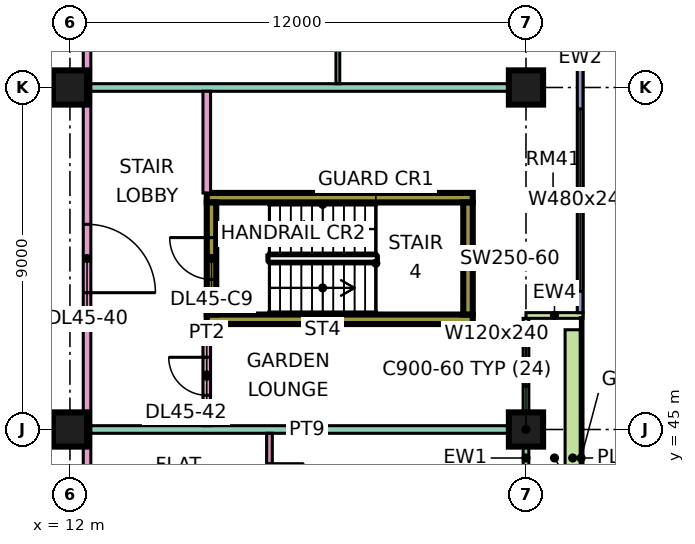
"""IFC4 building model, lengths in metres.
Left out: names, types, materials, properties, quantities, classifications, styles, units other than length and angle.
Written with IfcOpenShell. Run it as: python <this file> out.ifc"""

import sys

from ifc_helpers import new_model, si_unit, direction, frame, frame_2d, origin, origin_2d, place, context, subcontext, project, spatial, rectangle, extrude, element, fill, save


model = new_model("IFC4")
c1 = context("Model", 3, precision=1e-05, world=origin(), true_north=direction((0.0, 1.0)))
c2 = subcontext(c1, "Body", "Model", "MODEL_VIEW")
j1 = project(units=[si_unit("LENGTHUNIT", "METRE"), si_unit("PLANEANGLEUNIT", "RADIAN")], contexts=[c1])
p1 = place(None, origin())
s1 = spatial("IfcSite", under=j1, at=p1, CompositionType="ELEMENT")
p2 = place(p1, origin())
s2 = spatial("IfcBuilding", under=s1, at=p2, CompositionType="ELEMENT")
p3 = place(p2, frame((0.0, 0.0, 194.9)))
s3 = spatial("IfcBuildingStorey", under=s2, at=p3, CompositionType="ELEMENT", Elevation=194.9)
for number, where, z_axis, x_axis in (
    (1, (12.0, 45.0, 0.0), (0.0, 0.0, 1.0), (1.0, 0.0, 0.0)),
    (2, (12.0, 54.0, 0.0), (0.0, 0.0, 1.0), (1.0, 0.0, 0.0)),
    (3, (24.0, 45.0, 0.0), (0.0, 0.0, 1.0), (1.0, 0.0, 0.0)),
    (4, (24.0, 54.0, 0.0), (0.0, 0.0, 1.0), (1.0, 0.0, 0.0)),
):
    element("IfcColumn", number, at=place(p3, frame(where, z_axis=z_axis, x_axis=x_axis)), inside=s3, PredefinedType="COLUMN", context=c2, shape_type="SweptSolid", body=[
        extrude(rectangle(XDim=0.9, YDim=0.9, at=origin_2d()), origin(), (0.0, 0.0, 1.0), 3.75),
    ])
for number, where, z_axis, x_axis in (
    (5, (15.6, 47.9, 0.0), (0.0, 0.0, 1.0), (1.0, 0.0, 0.0)),
    (6, (15.6, 51.1, 0.0), (0.0, 0.0, 1.0), (1.0, 0.0, 0.0)),
):
    element("IfcWall", number, at=place(p3, frame(where, z_axis=z_axis, x_axis=x_axis)), inside=s3, PredefinedType="SHEAR", context=c2, shape_type="SweptSolid", body=[
        extrude(rectangle(XDim=7.0, YDim=0.25, at=frame_2d((3.5, 0.0))), origin(), (0.0, 0.0, 1.0), 3.75),
    ])
p4 = place(p3, frame((15.725, 48.025, 0.0), z_axis=(0.0, 0.0, 1.0), x_axis=(0.0, 1.0, 0.0)))
e7 = element("IfcWall", 7, at=p4, inside=s3, PredefinedType="SHEAR", context=c2, shape_type="SweptSolid", body=[
    extrude(rectangle(XDim=2.95, YDim=0.25, at=frame_2d((1.475, 0.0))), origin(), (0.0, 0.0, 1.0), 3.75),
])
p5 = place(p4, frame((0.925, 0.0, 0.0)))
e8 = element("IfcOpeningElement", 8, at=p5, cuts=e7, PredefinedType="OPENING", context=c2, shape_type="SweptSolid", body=[
    extrude(rectangle(XDim=1.1, YDim=2.2, at=frame_2d((0.55, 1.1))), frame((0.0, 0.135, 0.0), z_axis=(0.0, -1.0, 0.0), x_axis=(1.0, 0.0, 0.0)), (0.0, 0.0, 1.0), 0.27),
])
p6 = place(p3, frame((22.475, 48.025, 0.0), z_axis=(0.0, 0.0, 1.0), x_axis=(0.0, 1.0, 0.0)))
e9 = element("IfcWall", 9, at=p6, inside=s3, PredefinedType="SHEAR", context=c2, shape_type="SweptSolid", body=[
    extrude(rectangle(XDim=2.95, YDim=0.25, at=frame_2d((1.475, 0.0))), origin(), (0.0, 0.0, 1.0), 3.75),
])
p7 = place(p3, frame((24.0, 40.575, 0.0), z_axis=(0.0, 0.0, 1.0), x_axis=(0.0, 1.0, 0.0)))
e10 = element("IfcWall", 10, at=p7, inside=s3, PredefinedType="SOLIDWALL", context=c2, shape_type="SweptSolid", body=[
    extrude(rectangle(XDim=7.35, YDim=0.15, at=frame_2d((3.675, 0.0))), origin(), (0.0, 0.0, 1.0), 3.35),
])
p8 = place(p7, frame((0.262, 0.0, 0.45)))
e11 = element("IfcOpeningElement", 11, at=p8, cuts=e10, PredefinedType="OPENING", context=c2, shape_type="SweptSolid", body=[
    extrude(rectangle(XDim=0.9, YDim=2.4, at=frame_2d((0.45, 1.2))), frame((0.0, 0.085, 0.0), z_axis=(0.0, -1.0, 0.0), x_axis=(1.0, 0.0, 0.0)), (0.0, 0.0, 1.0), 0.17),
])
p9 = place(p7, frame((2.05, 0.0, 0.0)))
e12 = element("IfcOpeningElement", 12, at=p9, cuts=e10, PredefinedType="OPENING", context=c2, shape_type="SweptSolid", body=[
    extrude(rectangle(XDim=1.2, YDim=2.4, at=frame_2d((0.6, 1.2))), frame((0.0, 0.085, 0.0), z_axis=(0.0, -1.0, 0.0), x_axis=(1.0, 0.0, 0.0)), (0.0, 0.0, 1.0), 0.17),
])
p10 = place(p7, frame((5.562, 0.0, 0.45)))
e13 = element("IfcOpeningElement", 13, at=p10, cuts=e10, PredefinedType="OPENING", context=c2, shape_type="SweptSolid", body=[
    extrude(rectangle(XDim=1.2, YDim=2.4, at=frame_2d((0.6, 1.2))), frame((0.0, 0.085, 0.0), z_axis=(0.0, -1.0, 0.0), x_axis=(1.0, 0.0, 0.0)), (0.0, 0.0, 1.0), 0.17),
])
p11 = place(p3, frame((25.5, 48.0, 0.0), z_axis=(0.0, 0.0, 1.0), x_axis=(-1.0, 0.0, 0.0)))
e14 = element("IfcWall", 14, at=p11, inside=s3, PredefinedType="SOLIDWALL", context=c2, shape_type="SweptSolid", body=[
    extrude(rectangle(XDim=1.5, YDim=0.15, at=frame_2d((0.75, 0.0))), origin(), (0.0, 0.0, 1.0), 3.35),
])
p12 = place(p3, frame((25.425, 48.075, 0.0), z_axis=(0.0, 0.0, 1.0), x_axis=(0.0, 1.0, 0.0)))
e15 = element("IfcWall", 15, at=p12, inside=s3, PredefinedType="SOLIDWALL", context=c2, shape_type="SweptSolid", body=[
    extrude(rectangle(XDim=13.425, YDim=0.15, at=frame_2d((6.712, 0.0))), origin(), (0.0, 0.0, 1.0), 3.35),
])
p13 = place(p12, frame((0.562, 0.0, 0.45)))
e16 = element("IfcOpeningElement", 16, at=p13, cuts=e15, PredefinedType="OPENING", context=c2, shape_type="SweptSolid", body=[
    extrude(rectangle(XDim=4.8, YDim=2.4, at=frame_2d((2.4, 1.2))), frame((0.0, 0.085, 0.0), z_axis=(0.0, -1.0, 0.0), x_axis=(1.0, 0.0, 0.0)), (0.0, 0.0, 1.0), 0.17),
])
p14 = place(p12, frame((6.525, 0.0, 0.45)))
e17 = element("IfcOpeningElement", 17, at=p14, cuts=e15, PredefinedType="OPENING", context=c2, shape_type="SweptSolid", body=[
    extrude(rectangle(XDim=1.8, YDim=2.4, at=frame_2d((0.9, 1.2))), frame((0.0, 0.085, 0.0), z_axis=(0.0, -1.0, 0.0), x_axis=(1.0, 0.0, 0.0)), (0.0, 0.0, 1.0), 0.17),
])
p15 = place(p12, frame((9.525, 0.0, 0.45)))
e18 = element("IfcOpeningElement", 18, at=p15, cuts=e15, PredefinedType="OPENING", context=c2, shape_type="SweptSolid", body=[
    extrude(rectangle(XDim=1.8, YDim=2.4, at=frame_2d((0.9, 1.2))), frame((0.0, 0.085, 0.0), z_axis=(0.0, -1.0, 0.0), x_axis=(1.0, 0.0, 0.0)), (0.0, 0.0, 1.0), 0.17),
])
p16 = place(p12, frame((12.225, 0.0, 0.45)))
e19 = element("IfcOpeningElement", 19, at=p16, cuts=e15, PredefinedType="OPENING", context=c2, shape_type="SweptSolid", body=[
    extrude(rectangle(XDim=0.9, YDim=2.4, at=frame_2d((0.45, 1.2))), frame((0.0, 0.085, 0.0), z_axis=(0.0, -1.0, 0.0), x_axis=(1.0, 0.0, 0.0)), (0.0, 0.0, 1.0), 0.17),
])
p17 = place(p3, frame((25.229, 40.875, 0.0), z_axis=(0.0, 0.0, 1.0), x_axis=(0.0, 1.0, 0.0)))
e20 = element("IfcWall", 20, at=p17, inside=s3, PredefinedType="SOLIDWALL", context=c2, shape_type="SweptSolid", body=[
    extrude(rectangle(XDim=6.75, YDim=0.4, at=frame_2d((3.375, 0.0))), origin(), (0.0, 0.0, 1.0), 0.7),
])
p18 = place(p3, frame((12.45, 20.0, 0.0), z_axis=(0.0, 0.0, 1.0), x_axis=(0.0, 1.0, 0.0)))
e21 = element("IfcWall", 21, at=p18, inside=s3, PredefinedType="PARTITIONING", context=c2, shape_type="SweptSolid", body=[
    extrude(rectangle(XDim=42.926, YDim=0.2, at=frame_2d((21.463, 0.0))), origin(), (0.0, 0.0, 1.0), 3.35),
])
p19 = place(p18, frame((7.15, 0.0, 0.0)))
e22 = element("IfcOpeningElement", 22, at=p19, cuts=e21, PredefinedType="OPENING", context=c2, shape_type="SweptSolid", body=[
    extrude(rectangle(XDim=1.6, YDim=2.1, at=frame_2d((0.8, 1.05))), frame((0.0, 0.11, 0.0), z_axis=(0.0, -1.0, 0.0), x_axis=(1.0, 0.0, 0.0)), (0.0, 0.0, 1.0), 0.22),
])
p20 = place(p18, frame((13.5, 0.0, 0.0)))
e23 = element("IfcOpeningElement", 23, at=p20, cuts=e21, PredefinedType="OPENING", context=c2, shape_type="SweptSolid", body=[
    extrude(rectangle(XDim=1.0, YDim=2.1, at=frame_2d((0.5, 1.05))), frame((0.0, 0.11, 0.0), z_axis=(0.0, -1.0, 0.0), x_axis=(1.0, 0.0, 0.0)), (0.0, 0.0, 1.0), 0.22),
])
p21 = place(p18, frame((17.2, 0.0, 0.0)))
e24 = element("IfcOpeningElement", 24, at=p21, cuts=e21, PredefinedType="OPENING", context=c2, shape_type="SweptSolid", body=[
    extrude(rectangle(XDim=1.0, YDim=2.1, at=frame_2d((0.5, 1.05))), frame((0.0, 0.11, 0.0), z_axis=(0.0, -1.0, 0.0), x_axis=(1.0, 0.0, 0.0)), (0.0, 0.0, 1.0), 0.22),
])
p22 = place(p18, frame((35.2, 0.0, 0.0)))
e25 = element("IfcOpeningElement", 25, at=p22, cuts=e21, PredefinedType="OPENING", context=c2, shape_type="SweptSolid", body=[
    extrude(rectangle(XDim=1.0, YDim=2.1, at=frame_2d((0.5, 1.05))), frame((0.0, 0.11, 0.0), z_axis=(0.0, -1.0, 0.0), x_axis=(1.0, 0.0, 0.0)), (0.0, 0.0, 1.0), 0.22),
])
p23 = place(p18, frame((1.15, 0.0, 0.0)))
e26 = element("IfcOpeningElement", 26, at=p23, cuts=e21, PredefinedType="OPENING", context=c2, shape_type="SweptSolid", body=[
    extrude(rectangle(XDim=1.8, YDim=2.1, at=frame_2d((0.9, 1.05))), frame((0.0, 0.11, 0.0), z_axis=(0.0, -1.0, 0.0), x_axis=(1.0, 0.0, 0.0)), (0.0, 0.0, 1.0), 0.22),
])
p24 = place(p18, frame((28.6, 0.0, 0.0)))
e27 = element("IfcOpeningElement", 27, at=p24, cuts=e21, PredefinedType="OPENING", context=c2, shape_type="SweptSolid", body=[
    extrude(rectangle(XDim=1.8, YDim=2.1, at=frame_2d((0.9, 1.05))), frame((0.0, 0.11, 0.0), z_axis=(0.0, -1.0, 0.0), x_axis=(1.0, 0.0, 0.0)), (0.0, 0.0, 1.0), 0.22),
])
p25 = place(p3, frame((12.55, 45.0, 0.0), z_axis=(0.0, 0.0, 1.0), x_axis=(1.0, 0.0, 0.0)))
e28 = element("IfcWall", 28, at=p25, inside=s3, PredefinedType="PARTITIONING", context=c2, shape_type="SweptSolid", body=[
    extrude(rectangle(XDim=11.376, YDim=0.2, at=frame_2d((5.688, 0.0))), origin(), (0.0, 0.0, 1.0), 3.35),
])
p26 = place(p3, frame((12.55, 54.0, 0.0), z_axis=(0.0, 0.0, 1.0), x_axis=(1.0, 0.0, 0.0)))
e29 = element("IfcWall", 29, at=p26, inside=s3, PredefinedType="PARTITIONING", context=c2, shape_type="SweptSolid", body=[
    extrude(rectangle(XDim=11.45, YDim=0.2, at=frame_2d((5.725, 0.0))), origin(), (0.0, 0.0, 1.0), 3.35),
])
p27 = place(p3, frame((15.6, 45.1, 0.0), z_axis=(0.0, 0.0, 1.0), x_axis=(0.0, 1.0, 0.0)))
e30 = element("IfcWall", 30, at=p27, inside=s3, PredefinedType="PARTITIONING", context=c2, shape_type="SweptSolid", body=[
    extrude(rectangle(XDim=2.675, YDim=0.2, at=frame_2d((1.337, 0.0))), origin(), (0.0, 0.0, 1.0), 3.35),
])
p28 = place(p27, frame((0.8, 0.0, 0.0)))
e31 = element("IfcOpeningElement", 31, at=p28, cuts=e30, PredefinedType="OPENING", context=c2, shape_type="SweptSolid", body=[
    extrude(rectangle(XDim=1.0, YDim=2.1, at=frame_2d((0.5, 1.05))), frame((0.0, 0.11, 0.0), z_axis=(0.0, -1.0, 0.0), x_axis=(1.0, 0.0, 0.0)), (0.0, 0.0, 1.0), 0.22),
])
p29 = place(p3, frame((15.6, 51.225, 0.0), z_axis=(0.0, 0.0, 1.0), x_axis=(0.0, 1.0, 0.0)))
e32 = element("IfcWall", 32, at=p29, inside=s3, PredefinedType="PARTITIONING", context=c2, shape_type="SweptSolid", body=[
    extrude(rectangle(XDim=2.675, YDim=0.2, at=frame_2d((1.337, 0.0))), origin(), (0.0, 0.0, 1.0), 3.35),
])
p30 = place(p3, frame((17.25, 39.225, 0.0), z_axis=(0.0, 0.0, 1.0), x_axis=(0.0, 1.0, 0.0)))
e33 = element("IfcWall", 33, at=p30, inside=s3, PredefinedType="PARTITIONING", context=c2, shape_type="SweptSolid", body=[
    extrude(rectangle(XDim=5.675, YDim=0.15, at=frame_2d((2.837, 0.0))), origin(), (0.0, 0.0, 1.0), 3.35),
])
p31 = place(p30, frame((1.225, 0.0, 0.0)))
e34 = element("IfcOpeningElement", 34, at=p31, cuts=e33, PredefinedType="OPENING", context=c2, shape_type="SweptSolid", body=[
    extrude(rectangle(XDim=0.8, YDim=2.1, at=frame_2d((0.4, 1.05))), frame((0.0, 0.085, 0.0), z_axis=(0.0, -1.0, 0.0), x_axis=(1.0, 0.0, 0.0)), (0.0, 0.0, 1.0), 0.17),
])
p32 = place(p30, frame((3.975, 0.0, 0.0)))
e35 = element("IfcOpeningElement", 35, at=p32, cuts=e33, PredefinedType="OPENING", context=c2, shape_type="SweptSolid", body=[
    extrude(rectangle(XDim=0.9, YDim=2.1, at=frame_2d((0.45, 1.05))), frame((0.0, 0.085, 0.0), z_axis=(0.0, -1.0, 0.0), x_axis=(1.0, 0.0, 0.0)), (0.0, 0.0, 1.0), 0.17),
])
p33 = place(p3, frame((19.05, 54.1, 0.0), z_axis=(0.0, 0.0, 1.0), x_axis=(0.0, 1.0, 0.0)))
e36 = element("IfcWall", 36, at=p33, inside=s3, PredefinedType="PARTITIONING", context=c2, shape_type="SweptSolid", body=[
    extrude(rectangle(XDim=2.85, YDim=0.1, at=frame_2d((1.425, 0.0))), origin(), (0.0, 0.0, 1.0), 3.35),
])
p34 = place(p33, frame((0.95, 0.0, 0.0)))
e37 = element("IfcOpeningElement", 37, at=p34, cuts=e36, PredefinedType="OPENING", context=c2, shape_type="SweptSolid", body=[
    extrude(rectangle(XDim=0.9, YDim=2.1, at=frame_2d((0.45, 1.05))), frame((0.0, 0.06, 0.0), z_axis=(0.0, -1.0, 0.0), x_axis=(1.0, 0.0, 0.0)), (0.0, 0.0, 1.0), 0.12),
])
p35 = place(p10, origin())
e38 = element("IfcWindow", 38, at=p35, inside=s3, PartitioningType="SINGLE_PANEL", PredefinedType="WINDOW", context=c2, shape_type="SweptSolid", body=[
    extrude(rectangle(XDim=1.2, YDim=2.4, at=frame_2d((0.6, 1.2))), frame((0.0, 0.03, 0.0), z_axis=(0.0, -1.0, 0.0), x_axis=(1.0, 0.0, 0.0)), (0.0, 0.0, 1.0), 0.06),
])
fill(e13, e38)
p36 = place(p13, origin())
e39 = element("IfcWindow", 39, at=p36, inside=s3, PartitioningType="SINGLE_PANEL", PredefinedType="WINDOW", context=c2, shape_type="SweptSolid", body=[
    extrude(rectangle(XDim=4.8, YDim=2.4, at=frame_2d((2.4, 1.2))), frame((0.0, 0.03, 0.0), z_axis=(0.0, -1.0, 0.0), x_axis=(1.0, 0.0, 0.0)), (0.0, 0.0, 1.0), 0.06),
])
fill(e16, e39)
p37 = place(p14, origin())
e40 = element("IfcWindow", 40, at=p37, inside=s3, PartitioningType="SINGLE_PANEL", PredefinedType="WINDOW", context=c2, shape_type="SweptSolid", body=[
    extrude(rectangle(XDim=1.8, YDim=2.4, at=frame_2d((0.9, 1.2))), frame((0.0, 0.03, 0.0), z_axis=(0.0, -1.0, 0.0), x_axis=(1.0, 0.0, 0.0)), (0.0, 0.0, 1.0), 0.06),
])
fill(e17, e40)
p38 = place(p5, frame((1.1, 0.0, 0.0), z_axis=(0.0, 0.0, 1.0), x_axis=(-1.0, 0.0, 0.0)))
e41 = element("IfcDoor", 41, at=p38, inside=s3, OperationType="SINGLE_SWING_RIGHT", PredefinedType="DOOR", context=c2, shape_type="SweptSolid", body=[
    extrude(rectangle(XDim=1.1, YDim=2.2, at=frame_2d((0.55, 1.1))), frame((0.0, 0.025, 0.0), z_axis=(0.0, -1.0, 0.0), x_axis=(1.0, 0.0, 0.0)), (0.0, 0.0, 1.0), 0.05),
])
fill(e8, e41)
p39 = place(p32, origin())
e42 = element("IfcDoor", 42, at=p39, inside=s3, OperationType="SINGLE_SWING_RIGHT", PredefinedType="DOOR", context=c2, shape_type="SweptSolid", body=[
    extrude(rectangle(XDim=0.9, YDim=2.1, at=frame_2d((0.45, 1.05))), frame((0.0, 0.025, 0.0), z_axis=(0.0, -1.0, 0.0), x_axis=(1.0, 0.0, 0.0)), (0.0, 0.0, 1.0), 0.05),
])
fill(e35, e42)
p40 = place(p24, frame((1.8, 0.0, 0.0), z_axis=(0.0, 0.0, 1.0), x_axis=(-1.0, 0.0, 0.0)))
e43 = element("IfcDoor", 43, at=p40, inside=s3, OperationType="DOUBLE_DOOR_SINGLE_SWING", PredefinedType="DOOR", context=c2, shape_type="SweptSolid", body=[
    extrude(rectangle(XDim=1.8, YDim=2.1, at=frame_2d((0.9, 1.05))), frame((0.0, 0.025, 0.0), z_axis=(0.0, -1.0, 0.0), x_axis=(1.0, 0.0, 0.0)), (0.0, 0.0, 1.0), 0.05),
])
fill(e27, e43)
p41 = place(p28, frame((1.0, 0.0, 0.0), z_axis=(0.0, 0.0, 1.0), x_axis=(-1.0, 0.0, 0.0)))
e44 = element("IfcDoor", 44, at=p41, inside=s3, OperationType="SINGLE_SWING_RIGHT", PredefinedType="DOOR", context=c2, shape_type="SweptSolid", body=[
    extrude(rectangle(XDim=1.0, YDim=2.1, at=frame_2d((0.5, 1.05))), frame((0.0, 0.025, 0.0), z_axis=(0.0, -1.0, 0.0), x_axis=(1.0, 0.0, 0.0)), (0.0, 0.0, 1.0), 0.05),
])
fill(e31, e44)
save(model, sys.argv[1])
